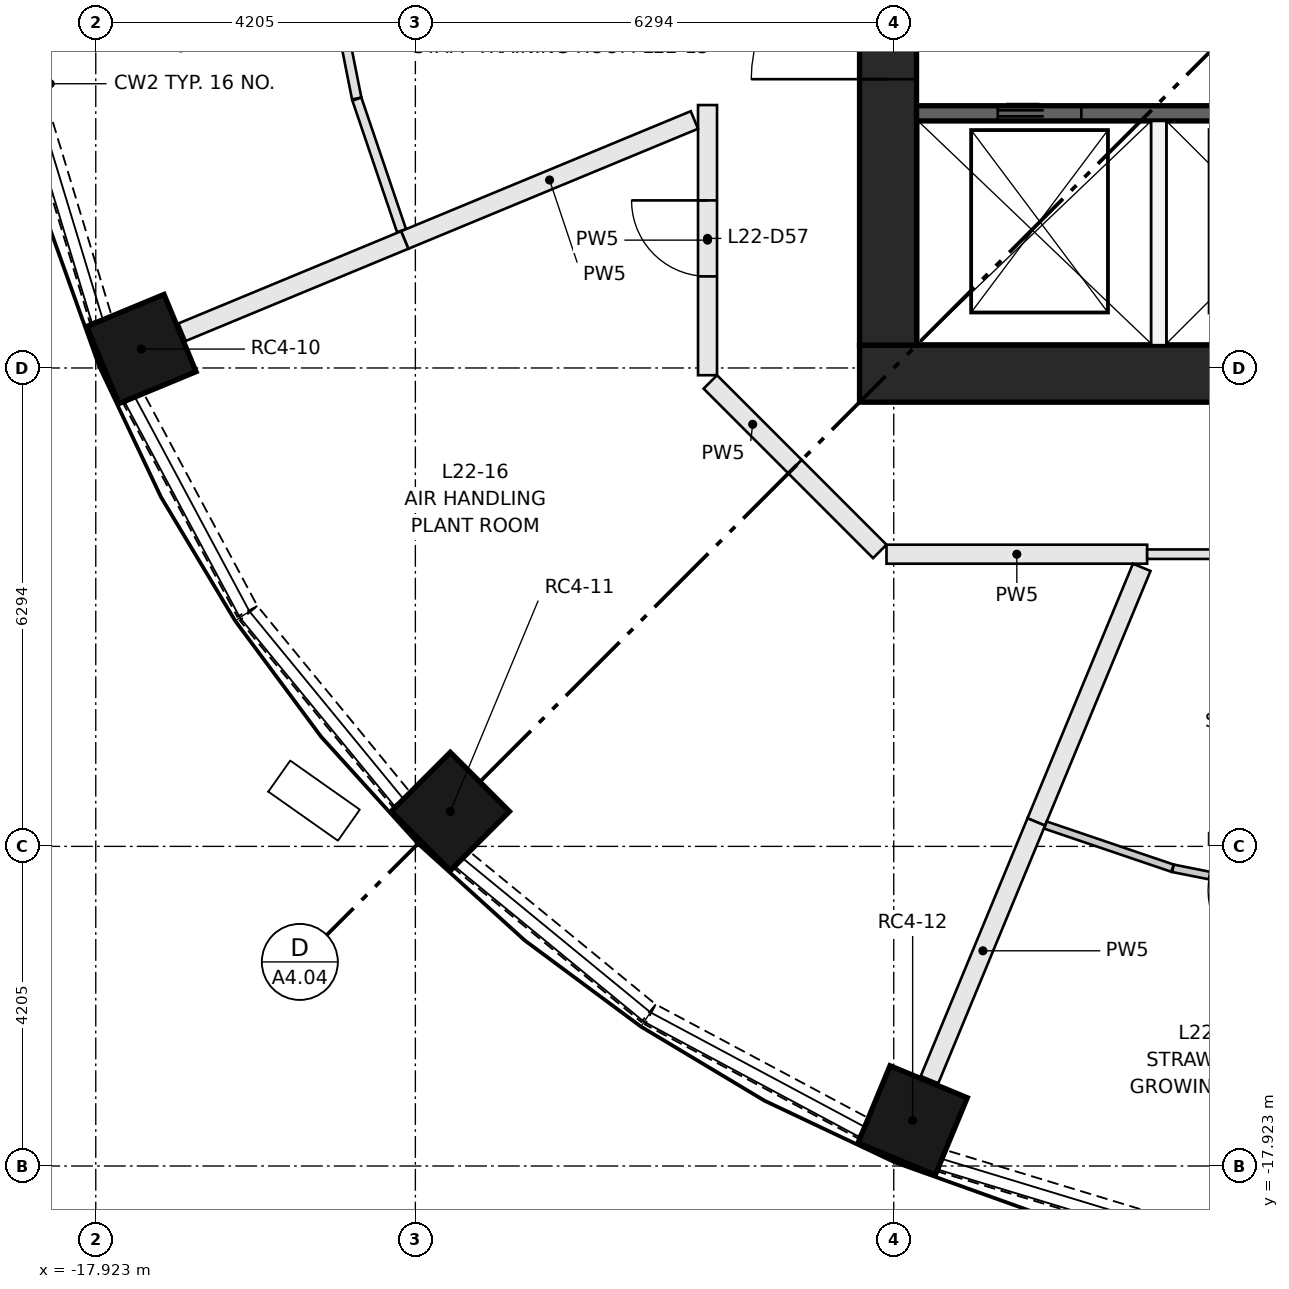
"""IFC4 building model, lengths in metres.
Left out: names, types, materials, properties, quantities, classifications, styles, units other than length and angle.
Written with IfcOpenShell. Run it as: python <this file> out.ifc"""

import sys

from ifc_helpers import new_model, si_unit, direction, frame, frame_2d, origin, origin_2d, place, context, subcontext, project, spatial, rectangle, extrude, element, fill, save


model = new_model("IFC4")
c1 = context("Model", 3, precision=1e-05, world=origin(), true_north=direction((0.0, 1.0)))
c2 = subcontext(c1, "Body", "Model", "MODEL_VIEW")
j1 = project(units=[si_unit("LENGTHUNIT", "METRE"), si_unit("PLANEANGLEUNIT", "RADIAN")], contexts=[c1])
p1 = place(None, origin())
s1 = spatial("IfcSite", under=j1, at=p1, CompositionType="ELEMENT")
p2 = place(p1, origin())
s2 = spatial("IfcBuilding", under=s1, at=p2, CompositionType="ELEMENT")
p3 = place(p2, frame((0.0, 0.0, 87.35)))
s3 = spatial("IfcBuildingStorey", under=s2, at=p3, CompositionType="ELEMENT", Elevation=87.35)
for number, where, z_axis, x_axis in (
    (1, (-17.323, -7.175, 0.0), (0.0, 0.0, 1.0), (-0.924, -0.383, 0.0)),
    (2, (-13.258, -13.258, 0.0), (0.0, 0.0, 1.0), (-0.707, -0.707, 0.0)),
    (3, (-7.175, -17.323, 0.0), (0.0, 0.0, 1.0), (-0.383, -0.924, 0.0)),
):
    element("IfcColumn", number, at=place(p3, frame(where, z_axis=z_axis, x_axis=x_axis)), inside=s3, PredefinedType="COLUMN", context=c2, shape_type="SweptSolid", body=[
        extrude(rectangle(XDim=1.1, YDim=1.1, at=origin_2d()), origin(), (0.0, 0.0, 1.0), 3.65),
    ])
p4 = place(p3, frame((-7.874, -7.499, 0.0), z_axis=(0.0, 0.0, 1.0), x_axis=(1.0, 0.0, 0.0)))
e4 = element("IfcWall", 4, at=p4, inside=s3, PredefinedType="SHEAR", context=c2, shape_type="SweptSolid", body=[
    extrude(rectangle(XDim=15.748, YDim=0.75, at=frame_2d((7.874, 0.0))), origin(), (0.0, 0.0, 1.0), 3.65),
])
p5 = place(p3, frame((-7.499, -7.124, 0.0), z_axis=(0.0, 0.0, 1.0), x_axis=(0.0, 1.0, 0.0)))
e5 = element("IfcWall", 5, at=p5, inside=s3, PredefinedType="SHEAR", context=c2, shape_type="SweptSolid", body=[
    extrude(rectangle(XDim=14.248, YDim=0.75, at=frame_2d((7.124, 0.0))), origin(), (0.0, 0.0, 1.0), 3.65),
])
p6 = place(p5, frame((6.624, 0.0, 0.0)))
e6 = element("IfcOpeningElement", 6, at=p6, cuts=e5, PredefinedType="OPENING", context=c2, shape_type="SweptSolid", body=[
    extrude(rectangle(XDim=1.0, YDim=2.1, at=frame_2d((0.5, 1.05))), frame((0.0, 0.385, 0.0), z_axis=(0.0, -1.0, 0.0), x_axis=(1.0, 0.0, 0.0)), (0.0, 0.0, 1.0), 0.77),
])
p7 = place(p5, frame((3.5, 0.0, 0.0)))
e7 = element("IfcOpeningElement", 7, at=p7, cuts=e5, PredefinedType="OPENING", context=c2, shape_type="SweptSolid", body=[
    extrude(rectangle(XDim=1.8, YDim=2.1, at=frame_2d((0.9, 1.05))), frame((0.0, 0.385, 0.0), z_axis=(0.0, -1.0, 0.0), x_axis=(1.0, 0.0, 0.0)), (0.0, 0.0, 1.0), 0.77),
])
p8 = place(p5, frame((8.948, 0.0, 0.0)))
e8 = element("IfcOpeningElement", 8, at=p8, cuts=e5, PredefinedType="OPENING", context=c2, shape_type="SweptSolid", body=[
    extrude(rectangle(XDim=1.8, YDim=2.1, at=frame_2d((0.9, 1.05))), frame((0.0, 0.385, 0.0), z_axis=(0.0, -1.0, 0.0), x_axis=(1.0, 0.0, 0.0)), (0.0, 0.0, 1.0), 0.77),
])
p9 = place(p5, frame((12.124, 0.0, 0.0)))
e9 = element("IfcOpeningElement", 9, at=p9, cuts=e5, PredefinedType="OPENING", context=c2, shape_type="SweptSolid", body=[
    extrude(rectangle(XDim=1.0, YDim=2.1, at=frame_2d((0.5, 1.05))), frame((0.0, 0.385, 0.0), z_axis=(0.0, -1.0, 0.0), x_axis=(1.0, 0.0, 0.0)), (0.0, 0.0, 1.0), 0.77),
])
p10 = place(p3, frame((-7.124, -4.074, 0.0), z_axis=(0.0, 0.0, 1.0), x_axis=(1.0, 0.0, 0.0)))
e10 = element("IfcWall", 10, at=p10, inside=s3, PredefinedType="SHEAR", context=c2, shape_type="SweptSolid", body=[
    extrude(rectangle(XDim=14.248, YDim=0.2, at=frame_2d((7.124, 0.0))), origin(), (0.0, 0.0, 1.0), 3.3),
])
p11 = place(p10, frame((1.069, 0.0, 0.0)))
e11 = element("IfcOpeningElement", 11, at=p11, cuts=e10, PredefinedType="OPENING", context=c2, shape_type="SweptSolid", body=[
    extrude(rectangle(XDim=1.1, YDim=2.1, at=frame_2d((0.55, 1.05))), frame((0.0, 0.11, 0.0), z_axis=(0.0, -1.0, 0.0), x_axis=(1.0, 0.0, 0.0)), (0.0, 0.0, 1.0), 0.22),
])
p12 = place(p10, frame((4.206, 0.0, 0.0)))
e12 = element("IfcOpeningElement", 12, at=p12, cuts=e10, PredefinedType="OPENING", context=c2, shape_type="SweptSolid", body=[
    extrude(rectangle(XDim=1.1, YDim=2.1, at=frame_2d((0.55, 1.05))), frame((0.0, 0.11, 0.0), z_axis=(0.0, -1.0, 0.0), x_axis=(1.0, 0.0, 0.0)), (0.0, 0.0, 1.0), 0.22),
])
p13 = place(p10, frame((6.808, 0.0, 0.0)))
e13 = element("IfcOpeningElement", 13, at=p13, cuts=e10, PredefinedType="OPENING", context=c2, shape_type="SweptSolid", body=[
    extrude(rectangle(XDim=1.0, YDim=2.1, at=frame_2d((0.5, 1.05))), frame((0.0, 0.11, 0.0), z_axis=(0.0, -1.0, 0.0), x_axis=(1.0, 0.0, 0.0)), (0.0, 0.0, 1.0), 0.22),
])
p14 = place(p10, frame((8.777, 0.0, 0.0)))
e14 = element("IfcOpeningElement", 14, at=p14, cuts=e10, PredefinedType="OPENING", context=c2, shape_type="SweptSolid", body=[
    extrude(rectangle(XDim=1.0, YDim=2.1, at=frame_2d((0.5, 1.05))), frame((0.0, 0.11, 0.0), z_axis=(0.0, -1.0, 0.0), x_axis=(1.0, 0.0, 0.0)), (0.0, 0.0, 1.0), 0.22),
])
p15 = place(p10, frame((10.745, 0.0, 0.0)))
e15 = element("IfcOpeningElement", 15, at=p15, cuts=e10, PredefinedType="OPENING", context=c2, shape_type="SweptSolid", body=[
    extrude(rectangle(XDim=1.0, YDim=2.1, at=frame_2d((0.5, 1.05))), frame((0.0, 0.11, 0.0), z_axis=(0.0, -1.0, 0.0), x_axis=(1.0, 0.0, 0.0)), (0.0, 0.0, 1.0), 0.22),
])
p16 = place(p10, frame((12.714, 0.0, 0.0)))
e16 = element("IfcOpeningElement", 16, at=p16, cuts=e10, PredefinedType="OPENING", context=c2, shape_type="SweptSolid", body=[
    extrude(rectangle(XDim=1.0, YDim=2.1, at=frame_2d((0.5, 1.05))), frame((0.0, 0.11, 0.0), z_axis=(0.0, -1.0, 0.0), x_axis=(1.0, 0.0, 0.0)), (0.0, 0.0, 1.0), 0.22),
])
p17 = place(p3, frame((-3.937, -7.124, 0.0), z_axis=(0.0, 0.0, 1.0), x_axis=(0.0, 1.0, 0.0)))
e17 = element("IfcWall", 17, at=p17, inside=s3, PredefinedType="PARTITIONING", context=c2, shape_type="SweptSolid", body=[
    extrude(rectangle(XDim=2.95, YDim=0.2, at=frame_2d((1.475, 0.0))), origin(), (0.0, 0.0, 1.0), 3.3),
])
p18 = place(p3, frame((-18.778, -3.75, 0.0), z_axis=(0.0, 0.0, 1.0), x_axis=(0.290325591482, -0.956927923582, 0.0)))
e18 = element("IfcWall", 18, at=p18, inside=s3, PredefinedType="SOLIDWALL", context=c2, shape_type="SweptSolid", body=[
    extrude(rectangle(XDim=3.173, YDim=0.3, at=frame_2d((1.586, 0.0))), origin(), (0.0, 0.0, 1.0), 0.9),
])
p19 = place(p3, frame((-17.425, -7.828, 0.0), z_axis=(0.0, 0.0, 1.0), x_axis=(0.471458802606, -0.88188808669, 0.0)))
e19 = element("IfcWall", 19, at=p19, inside=s3, PredefinedType="SOLIDWALL", context=c2, shape_type="SweptSolid", body=[
    extrude(rectangle(XDim=3.172, YDim=0.3, at=frame_2d((1.586, 0.0))), origin(), (0.0, 0.0, 1.0), 0.9),
])
for number, where, z_axis, x_axis in (
    (20, (-15.913, -10.651, 0.0), (0.0, 0.0, 1.0), (0.634, -0.773, 0.0)),
    (21, (-13.104, -13.9, 0.0), (0.0, 0.0, 1.0), (0.773, -0.634, 0.0)),
):
    element("IfcWall", number, at=place(p3, frame(where, z_axis=z_axis, x_axis=x_axis)), inside=s3, PredefinedType="SOLIDWALL", context=c2, shape_type="SweptSolid", body=[
        extrude(rectangle(XDim=3.173, YDim=0.3, at=frame_2d((1.586, 0.0))), origin(), (0.0, 0.0, 1.0), 0.9),
    ])
p20 = place(p3, frame((-10.626, -15.929, 0.0), z_axis=(0.0, 0.0, 1.0), x_axis=(0.88188808669, -0.471458802606, 0.0)))
e22 = element("IfcWall", 22, at=p20, inside=s3, PredefinedType="SOLIDWALL", context=c2, shape_type="SweptSolid", body=[
    extrude(rectangle(XDim=3.172, YDim=0.3, at=frame_2d((1.586, 0.0))), origin(), (0.0, 0.0, 1.0), 0.9),
])
p21 = place(p3, frame((-6.787, -17.856, 0.0), z_axis=(0.0, 0.0, 1.0), x_axis=(0.956927923582, -0.290325591482, 0.0)))
e23 = element("IfcWall", 23, at=p21, inside=s3, PredefinedType="SOLIDWALL", context=c2, shape_type="SweptSolid", body=[
    extrude(rectangle(XDim=3.173, YDim=0.3, at=frame_2d((1.586, 0.0))), origin(), (0.0, 0.0, 1.0), 0.9),
])
p22 = place(p3, frame((-9.874, -7.519, 0.0), z_axis=(0.0, 0.0, 1.0), x_axis=(0.0, 1.0, 0.0)))
e24 = element("IfcWall", 24, at=p22, inside=s3, PredefinedType="PARTITIONING", context=c2, shape_type="SweptSolid", body=[
    extrude(rectangle(XDim=3.554, YDim=0.25, at=frame_2d((1.777, 0.0))), origin(), (0.0, 0.0, 1.0), 3.3),
])
p23 = place(p22, frame((1.3, 0.0, 0.0)))
e25 = element("IfcOpeningElement", 25, at=p23, cuts=e24, PredefinedType="OPENING", context=c2, shape_type="SweptSolid", body=[
    extrude(rectangle(XDim=1.0, YDim=2.1, at=frame_2d((0.5, 1.05))), frame((0.0, 0.135, 0.0), z_axis=(0.0, -1.0, 0.0), x_axis=(1.0, 0.0, 0.0)), (0.0, 0.0, 1.0), 0.27),
])
for number, where, z_axis, x_axis in (
    (26, (-8.722, -8.722, 0.0), (0.0, 0.0, 1.0), (-0.707, 0.707, 0.0)),
    (27, (-7.608, -9.837, 0.0), (0.0, 0.0, 1.0), (-0.707, 0.707, 0.0)),
):
    element("IfcWall", number, at=place(p3, frame(where, z_axis=z_axis, x_axis=x_axis)), inside=s3, PredefinedType="PARTITIONING", context=c2, shape_type="SweptSolid", body=[
        extrude(rectangle(XDim=1.577, YDim=0.25, at=frame_2d((0.788, 0.0))), origin(), (0.0, 0.0, 1.0), 3.3),
    ])
p24 = place(p3, frame((-4.09, -9.874, 0.0), z_axis=(0.0, 0.0, 1.0), x_axis=(-1.0, 0.0, 0.0)))
e28 = element("IfcWall", 28, at=p24, inside=s3, PredefinedType="PARTITIONING", context=c2, shape_type="SweptSolid", body=[
    extrude(rectangle(XDim=3.429, YDim=0.25, at=frame_2d((1.715, 0.0))), origin(), (0.0, 0.0, 1.0), 3.3),
])
p25 = place(p3, frame((0.0, -9.874, 0.0), z_axis=(0.0, 0.0, 1.0), x_axis=(-1.0, 0.0, 0.0)))
e29 = element("IfcWall", 29, at=p25, inside=s3, PredefinedType="PARTITIONING", context=c2, shape_type="SweptSolid", body=[
    extrude(rectangle(XDim=4.09, YDim=0.125, at=frame_2d((2.045, 0.0))), origin(), (0.0, 0.0, 1.0), 3.3),
])
p26 = place(p25, frame((1.5, 0.0, 0.0)))
e30 = element("IfcOpeningElement", 30, at=p26, cuts=e29, PredefinedType="OPENING", context=c2, shape_type="SweptSolid", body=[
    extrude(rectangle(XDim=1.0, YDim=2.1, at=frame_2d((0.5, 1.05))), frame((0.0, 0.073, 0.0), z_axis=(0.0, -1.0, 0.0), x_axis=(1.0, 0.0, 0.0)), (0.0, 0.0, 1.0), 0.145),
])
p27 = place(p3, frame((-14.49, -3.878, 0.0), z_axis=(0.0, 0.0, 1.0), x_axis=(-0.195034785279, 0.980796325713, 0.0)))
e31 = element("IfcWall", 31, at=p27, inside=s3, PredefinedType="PARTITIONING", context=c2, shape_type="SweptSolid", body=[
    extrude(rectangle(XDim=1.954, YDim=0.125, at=frame_2d((0.977, 0.0))), origin(), (0.0, 0.0, 1.0), 3.3),
])
p28 = place(p3, frame((-13.9, -5.618, 0.0), z_axis=(0.0, 0.0, 1.0), x_axis=(-0.321390424162, 0.946946775303, 0.0)))
e32 = element("IfcWall", 32, at=p28, inside=s3, PredefinedType="PARTITIONING", context=c2, shape_type="SweptSolid", body=[
    extrude(rectangle(XDim=1.828, YDim=0.125, at=frame_2d((0.914, 0.0))), origin(), (0.0, 0.0, 1.0), 3.3),
])
p29 = place(p3, frame((-10.047, -4.162, 0.0), z_axis=(0.0, 0.0, 1.0), x_axis=(-0.92388555685, -0.382668888001, 0.0)))
e33 = element("IfcWall", 33, at=p29, inside=s3, PredefinedType="PARTITIONING", context=c2, shape_type="SweptSolid", body=[
    extrude(rectangle(XDim=4.125, YDim=0.25, at=frame_2d((2.062, 0.0))), origin(), (0.0, 0.0, 1.0), 3.3),
])
p30 = place(p3, frame((-13.858, -5.74, 0.0), z_axis=(0.0, 0.0, 1.0), x_axis=(-0.923876970079, -0.382689618566, 0.0)))
e34 = element("IfcWall", 34, at=p30, inside=s3, PredefinedType="PARTITIONING", context=c2, shape_type="SweptSolid", body=[
    extrude(rectangle(XDim=3.17, YDim=0.25, at=frame_2d((1.585, 0.0))), origin(), (0.0, 0.0, 1.0), 3.3),
])
p31 = place(p3, frame((-4.162, -10.047, 0.0), z_axis=(0.0, 0.0, 1.0), x_axis=(-0.382649180879, -0.923893719197, 0.0)))
e35 = element("IfcWall", 35, at=p31, inside=s3, PredefinedType="PARTITIONING", context=c2, shape_type="SweptSolid", body=[
    extrude(rectangle(XDim=3.625, YDim=0.25, at=frame_2d((1.812, 0.0))), origin(), (0.0, 0.0, 1.0), 3.3),
])
p32 = place(p3, frame((-5.549, -13.396, 0.0), z_axis=(0.0, 0.0, 1.0), x_axis=(-0.382706260748, -0.923870076355, 0.0)))
e36 = element("IfcWall", 36, at=p32, inside=s3, PredefinedType="PARTITIONING", context=c2, shape_type="SweptSolid", body=[
    extrude(rectangle(XDim=3.67, YDim=0.25, at=frame_2d((1.835, 0.0))), origin(), (0.0, 0.0, 1.0), 3.3),
])
p33 = place(p3, frame((-3.756, -14.005, 0.0), z_axis=(0.0, 0.0, 1.0), x_axis=(-0.946911786272, 0.321493497633, 0.0)))
e37 = element("IfcWall", 37, at=p33, inside=s3, PredefinedType="PARTITIONING", context=c2, shape_type="SweptSolid", body=[
    extrude(rectangle(XDim=1.765, YDim=0.1, at=frame_2d((0.882, 0.0))), origin(), (0.0, 0.0, 1.0), 3.3),
])
p34 = place(p3, frame((-1.896, -14.375, 0.0), z_axis=(0.0, 0.0, 1.0), x_axis=(-0.980773924018, 0.19514740574, 0.0)))
e38 = element("IfcWall", 38, at=p34, inside=s3, PredefinedType="PARTITIONING", context=c2, shape_type="SweptSolid", body=[
    extrude(rectangle(XDim=1.89, YDim=0.1, at=frame_2d((0.945, 0.0))), origin(), (0.0, 0.0, 1.0), 3.3),
])
p35 = place(p34, frame((0.4, 0.0, 0.0)))
e39 = element("IfcOpeningElement", 39, at=p35, cuts=e38, PredefinedType="OPENING", context=c2, shape_type="SweptSolid", body=[
    extrude(rectangle(XDim=1.0, YDim=2.1, at=frame_2d((0.5, 1.05))), frame((0.0, 0.06, 0.0), z_axis=(0.0, -1.0, 0.0), x_axis=(1.0, 0.0, 0.0)), (0.0, 0.0, 1.0), 0.12),
])
p36 = place(p11, origin())
e40 = element("IfcDoor", 40, at=p36, inside=s3, OperationType="DOUBLE_DOOR_SLIDING", PredefinedType="DOOR", context=c2, shape_type="SweptSolid", body=[
    extrude(rectangle(XDim=1.1, YDim=2.1, at=frame_2d((0.55, 1.05))), frame((0.0, 0.025, 0.0), z_axis=(0.0, -1.0, 0.0), x_axis=(1.0, 0.0, 0.0)), (0.0, 0.0, 1.0), 0.05),
])
fill(e11, e40)
p37 = place(p7, origin())
e41 = element("IfcDoor", 41, at=p37, inside=s3, OperationType="DOUBLE_DOOR_SINGLE_SWING", PredefinedType="DOOR", context=c2, shape_type="SweptSolid", body=[
    extrude(rectangle(XDim=1.8, YDim=2.1, at=frame_2d((0.9, 1.05))), frame((0.0, 0.025, 0.0), z_axis=(0.0, -1.0, 0.0), x_axis=(1.0, 0.0, 0.0)), (0.0, 0.0, 1.0), 0.05),
])
fill(e7, e41)
p38 = place(p23, origin())
e42 = element("IfcDoor", 42, at=p38, inside=s3, OperationType="SINGLE_SWING_RIGHT", PredefinedType="DOOR", context=c2, shape_type="SweptSolid", body=[
    extrude(rectangle(XDim=1.0, YDim=2.1, at=frame_2d((0.5, 1.05))), frame((0.0, 0.025, 0.0), z_axis=(0.0, -1.0, 0.0), x_axis=(1.0, 0.0, 0.0)), (0.0, 0.0, 1.0), 0.05),
])
fill(e25, e42)
save(model, sys.argv[1])
